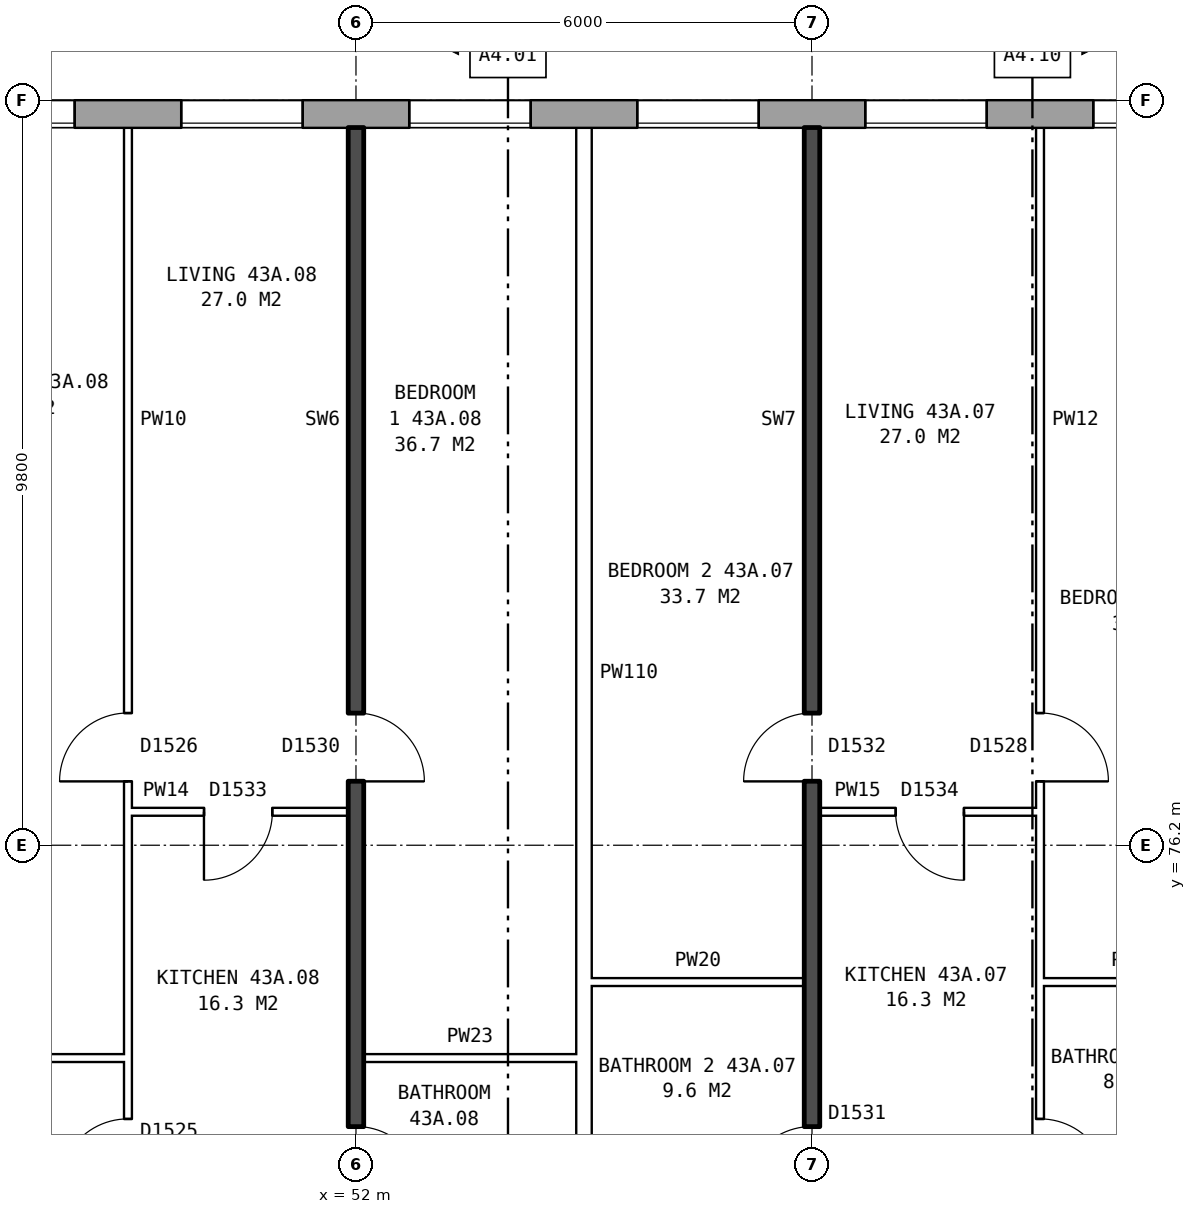
"""IFC4 building model, lengths in metres.
Left out: names, types, materials, properties, quantities, classifications, styles, units other than length and angle.
Written with IfcOpenShell. Run it as: python <this file> out.ifc"""

import sys

from ifc_helpers import new_model, si_unit, direction, frame, frame_2d, origin, place, context, subcontext, project, spatial, rectangle, extrude, element, fill, save


model = new_model("IFC4")
c1 = context("Model", 3, precision=1e-05, world=origin(), true_north=direction((0.0, 1.0)))
c2 = subcontext(c1, "Body", "Model", "MODEL_VIEW")
j1 = project(units=[si_unit("LENGTHUNIT", "METRE"), si_unit("PLANEANGLEUNIT", "RADIAN")], contexts=[c1])
p1 = place(None, origin())
s1 = spatial("IfcSite", under=j1, at=p1, CompositionType="ELEMENT")
p2 = place(p1, origin())
s2 = spatial("IfcBuilding", under=s1, at=p2, CompositionType="ELEMENT")
p3 = place(p2, frame((0.0, 0.0, 154.7)))
s3 = spatial("IfcBuildingStorey", under=s2, at=p3, CompositionType="ELEMENT", Elevation=154.7)
p4 = place(p3, frame((72.925, 85.82, 0.0), z_axis=(0.0, 0.0, 1.0), x_axis=(-1.0, 0.0, 0.0)))
e1 = element("IfcWall", 1, at=p4, inside=s3, PredefinedType="STANDARD", context=c2, shape_type="SweptSolid", body=[
    extrude(rectangle(XDim=41.351, YDim=0.36, at=frame_2d((20.675, 0.0))), origin(), (0.0, 0.0, 1.0), 2.85),
])
p5 = place(p4, frame((0.625, 0.0, 0.8)))
e2 = element("IfcOpeningElement", 2, at=p5, cuts=e1, PredefinedType="OPENING", context=c2, shape_type="SweptSolid", body=[
    extrude(rectangle(XDim=1.6, YDim=1.8, at=frame_2d((0.8, 0.9))), frame((0.0, 0.19, 0.0), z_axis=(0.0, -1.0, 0.0), x_axis=(1.0, 0.0, 0.0)), (0.0, 0.0, 1.0), 0.38),
])
p6 = place(p4, frame((3.625, 0.0, 0.8)))
e3 = element("IfcOpeningElement", 3, at=p6, cuts=e1, PredefinedType="OPENING", context=c2, shape_type="SweptSolid", body=[
    extrude(rectangle(XDim=1.6, YDim=1.8, at=frame_2d((0.8, 0.9))), frame((0.0, 0.19, 0.0), z_axis=(0.0, -1.0, 0.0), x_axis=(1.0, 0.0, 0.0)), (0.0, 0.0, 1.0), 0.38),
])
p7 = place(p4, frame((5.525, 0.0, 1.7)))
e4 = element("IfcOpeningElement", 4, at=p7, cuts=e1, PredefinedType="OPENING", context=c2, shape_type="SweptSolid", body=[
    extrude(rectangle(XDim=1.4, YDim=0.9, at=frame_2d((0.7, 0.45))), frame((0.0, 0.19, 0.0), z_axis=(0.0, -1.0, 0.0), x_axis=(1.0, 0.0, 0.0)), (0.0, 0.0, 1.0), 0.38),
])
p8 = place(p4, frame((9.625, 0.0, 0.8)))
e5 = element("IfcOpeningElement", 5, at=p8, cuts=e1, PredefinedType="OPENING", context=c2, shape_type="SweptSolid", body=[
    extrude(rectangle(XDim=1.6, YDim=1.8, at=frame_2d((0.8, 0.9))), frame((0.0, 0.19, 0.0), z_axis=(0.0, -1.0, 0.0), x_axis=(1.0, 0.0, 0.0)), (0.0, 0.0, 1.0), 0.38),
])
p9 = place(p4, frame((12.625, 0.0, 0.8)))
e6 = element("IfcOpeningElement", 6, at=p9, cuts=e1, PredefinedType="OPENING", context=c2, shape_type="SweptSolid", body=[
    extrude(rectangle(XDim=1.6, YDim=1.8, at=frame_2d((0.8, 0.9))), frame((0.0, 0.19, 0.0), z_axis=(0.0, -1.0, 0.0), x_axis=(1.0, 0.0, 0.0)), (0.0, 0.0, 1.0), 0.38),
])
p10 = place(p4, frame((15.625, 0.0, 0.8)))
e7 = element("IfcOpeningElement", 7, at=p10, cuts=e1, PredefinedType="OPENING", context=c2, shape_type="SweptSolid", body=[
    extrude(rectangle(XDim=1.6, YDim=1.8, at=frame_2d((0.8, 0.9))), frame((0.0, 0.19, 0.0), z_axis=(0.0, -1.0, 0.0), x_axis=(1.0, 0.0, 0.0)), (0.0, 0.0, 1.0), 0.38),
])
p11 = place(p4, frame((18.625, 0.0, 0.8)))
e8 = element("IfcOpeningElement", 8, at=p11, cuts=e1, PredefinedType="OPENING", context=c2, shape_type="SweptSolid", body=[
    extrude(rectangle(XDim=1.6, YDim=1.8, at=frame_2d((0.8, 0.9))), frame((0.0, 0.19, 0.0), z_axis=(0.0, -1.0, 0.0), x_axis=(1.0, 0.0, 0.0)), (0.0, 0.0, 1.0), 0.38),
])
p12 = place(p4, frame((21.625, 0.0, 0.8)))
e9 = element("IfcOpeningElement", 9, at=p12, cuts=e1, PredefinedType="OPENING", context=c2, shape_type="SweptSolid", body=[
    extrude(rectangle(XDim=1.6, YDim=1.8, at=frame_2d((0.8, 0.9))), frame((0.0, 0.19, 0.0), z_axis=(0.0, -1.0, 0.0), x_axis=(1.0, 0.0, 0.0)), (0.0, 0.0, 1.0), 0.38),
])
p13 = place(p4, frame((24.625, 0.0, 0.8)))
e10 = element("IfcOpeningElement", 10, at=p13, cuts=e1, PredefinedType="OPENING", context=c2, shape_type="SweptSolid", body=[
    extrude(rectangle(XDim=1.6, YDim=1.8, at=frame_2d((0.8, 0.9))), frame((0.0, 0.19, 0.0), z_axis=(0.0, -1.0, 0.0), x_axis=(1.0, 0.0, 0.0)), (0.0, 0.0, 1.0), 0.38),
])
p14 = place(p4, frame((27.625, 0.0, 0.8)))
e11 = element("IfcOpeningElement", 11, at=p14, cuts=e1, PredefinedType="OPENING", context=c2, shape_type="SweptSolid", body=[
    extrude(rectangle(XDim=1.6, YDim=1.8, at=frame_2d((0.8, 0.9))), frame((0.0, 0.19, 0.0), z_axis=(0.0, -1.0, 0.0), x_axis=(1.0, 0.0, 0.0)), (0.0, 0.0, 1.0), 0.38),
])
p15 = place(p4, frame((30.625, 0.0, 0.8)))
e12 = element("IfcOpeningElement", 12, at=p15, cuts=e1, PredefinedType="OPENING", context=c2, shape_type="SweptSolid", body=[
    extrude(rectangle(XDim=1.6, YDim=1.8, at=frame_2d((0.8, 0.9))), frame((0.0, 0.19, 0.0), z_axis=(0.0, -1.0, 0.0), x_axis=(1.0, 0.0, 0.0)), (0.0, 0.0, 1.0), 0.38),
])
p16 = place(p4, frame((34.425, 0.0, 1.7)))
e13 = element("IfcOpeningElement", 13, at=p16, cuts=e1, PredefinedType="OPENING", context=c2, shape_type="SweptSolid", body=[
    extrude(rectangle(XDim=0.6, YDim=0.9, at=frame_2d((0.3, 0.45))), frame((0.0, 0.19, 0.0), z_axis=(0.0, -1.0, 0.0), x_axis=(1.0, 0.0, 0.0)), (0.0, 0.0, 1.0), 0.38),
])
p17 = place(p4, frame((36.625, 0.0, 0.8)))
e14 = element("IfcOpeningElement", 14, at=p17, cuts=e1, PredefinedType="OPENING", context=c2, shape_type="SweptSolid", body=[
    extrude(rectangle(XDim=1.6, YDim=1.8, at=frame_2d((0.8, 0.9))), frame((0.0, 0.19, 0.0), z_axis=(0.0, -1.0, 0.0), x_axis=(1.0, 0.0, 0.0)), (0.0, 0.0, 1.0), 0.38),
])
p18 = place(p4, frame((35.325, 0.0, 1.0)))
e15 = element("IfcOpeningElement", 15, at=p18, cuts=e1, PredefinedType="OPENING", context=c2, shape_type="SweptSolid", body=[
    extrude(rectangle(XDim=1.0, YDim=1.5, at=frame_2d((0.5, 0.75))), frame((0.0, 0.19, 0.0), z_axis=(0.0, -1.0, 0.0), x_axis=(1.0, 0.0, 0.0)), (0.0, 0.0, 1.0), 0.38),
])
p19 = place(p3, frame((46.1, 73.4, 0.0), z_axis=(0.0, 0.0, 1.0), x_axis=(1.0, 0.0, 0.0)))
e16 = element("IfcWall", 16, at=p19, inside=s3, PredefinedType="PARTITIONING", context=c2, shape_type="SweptSolid", body=[
    extrude(rectangle(XDim=2.9, YDim=0.1, at=frame_2d((1.45, 0.0))), origin(), (0.0, 0.0, 1.0), 2.85),
])
for number, where, z_axis, x_axis in (
    (17, (52.1, 73.4, 0.0), (0.0, 0.0, 1.0), (1.0, 0.0, 0.0)),
    (18, (55.1, 74.4, 0.0), (0.0, 0.0, 1.0), (1.0, 0.0, 0.0)),
):
    element("IfcWall", number, at=place(p3, frame(where, z_axis=z_axis, x_axis=x_axis)), inside=s3, PredefinedType="PARTITIONING", context=c2, shape_type="SweptSolid", body=[
        extrude(rectangle(XDim=2.8, YDim=0.1, at=frame_2d((1.4, 0.0))), origin(), (0.0, 0.0, 1.0), 2.85),
    ])
p20 = place(p3, frame((61.0, 74.4, 0.0), z_axis=(0.0, 0.0, 1.0), x_axis=(1.0, 0.0, 0.0)))
e19 = element("IfcWall", 19, at=p20, inside=s3, PredefinedType="PARTITIONING", context=c2, shape_type="SweptSolid", body=[
    extrude(rectangle(XDim=2.64, YDim=0.1, at=frame_2d((1.32, 0.0))), origin(), (0.0, 0.0, 1.0), 2.85),
])
p21 = place(p3, frame((49.0, 76.64, 0.0), z_axis=(0.0, 0.0, 1.0), x_axis=(1.0, 0.0, 0.0)))
e20 = element("IfcWall", 20, at=p21, inside=s3, PredefinedType="PARTITIONING", context=c2, shape_type="SweptSolid", body=[
    extrude(rectangle(XDim=2.9, YDim=0.1, at=frame_2d((1.45, 0.0))), origin(), (0.0, 0.0, 1.0), 2.85),
])
p22 = place(p21, frame((1.0, 0.0, 0.0)))
e21 = element("IfcOpeningElement", 21, at=p22, cuts=e20, PredefinedType="OPENING", context=c2, shape_type="SweptSolid", body=[
    extrude(rectangle(XDim=0.9, YDim=2.1, at=frame_2d((0.45, 1.05))), frame((0.0, 0.06, 0.0), z_axis=(0.0, -1.0, 0.0), x_axis=(1.0, 0.0, 0.0)), (0.0, 0.0, 1.0), 0.12),
])
p23 = place(p3, frame((58.1, 76.64, 0.0), z_axis=(0.0, 0.0, 1.0), x_axis=(1.0, 0.0, 0.0)))
e22 = element("IfcWall", 22, at=p23, inside=s3, PredefinedType="PARTITIONING", context=c2, shape_type="SweptSolid", body=[
    extrude(rectangle(XDim=2.9, YDim=0.1, at=frame_2d((1.45, 0.0))), origin(), (0.0, 0.0, 1.0), 2.85),
])
p24 = place(p23, frame((1.0, 0.0, 0.0)))
e23 = element("IfcOpeningElement", 23, at=p24, cuts=e22, PredefinedType="OPENING", context=c2, shape_type="SweptSolid", body=[
    extrude(rectangle(XDim=0.9, YDim=2.1, at=frame_2d((0.45, 1.05))), frame((0.0, 0.06, 0.0), z_axis=(0.0, -1.0, 0.0), x_axis=(1.0, 0.0, 0.0)), (0.0, 0.0, 1.0), 0.12),
])
p25 = place(p3, frame((49.0, 71.3, 0.0), z_axis=(0.0, 0.0, 1.0), x_axis=(0.0, 1.0, 0.0)))
e24 = element("IfcWall", 24, at=p25, inside=s3, PredefinedType="PARTITIONING", context=c2, shape_type="SweptSolid", body=[
    extrude(rectangle(XDim=14.34, YDim=0.1, at=frame_2d((7.17, 0.0))), origin(), (0.0, 0.0, 1.0), 2.85),
])
p26 = place(p25, frame((5.74, 0.0, 0.0)))
e25 = element("IfcOpeningElement", 25, at=p26, cuts=e24, PredefinedType="OPENING", context=c2, shape_type="SweptSolid", body=[
    extrude(rectangle(XDim=0.9, YDim=2.1, at=frame_2d((0.45, 1.05))), frame((0.0, 0.06, 0.0), z_axis=(0.0, -1.0, 0.0), x_axis=(1.0, 0.0, 0.0)), (0.0, 0.0, 1.0), 0.12),
])
p27 = place(p25, frame((0.4, 0.0, 0.0)))
e26 = element("IfcOpeningElement", 26, at=p27, cuts=e24, PredefinedType="OPENING", context=c2, shape_type="SweptSolid", body=[
    extrude(rectangle(XDim=0.9, YDim=2.1, at=frame_2d((0.45, 1.05))), frame((0.0, 0.06, 0.0), z_axis=(0.0, -1.0, 0.0), x_axis=(1.0, 0.0, 0.0)), (0.0, 0.0, 1.0), 0.12),
])
p28 = place(p3, frame((52.0, 71.2, 0.0), z_axis=(0.0, 0.0, 1.0), x_axis=(0.0, 1.0, 0.0)))
e27 = element("IfcWall", 27, at=p28, inside=s3, PredefinedType="SOLIDWALL", context=c2, shape_type="SweptSolid", body=[
    extrude(rectangle(XDim=14.44, YDim=0.2, at=frame_2d((7.22, 0.0))), origin(), (0.0, 0.0, 1.0), 2.85),
])
p29 = place(p28, frame((5.84, 0.0, 0.0)))
e28 = element("IfcOpeningElement", 28, at=p29, cuts=e27, PredefinedType="OPENING", context=c2, shape_type="SweptSolid", body=[
    extrude(rectangle(XDim=0.9, YDim=2.1, at=frame_2d((0.45, 1.05))), frame((0.0, 0.11, 0.0), z_axis=(0.0, -1.0, 0.0), x_axis=(1.0, 0.0, 0.0)), (0.0, 0.0, 1.0), 0.22),
])
p30 = place(p28, frame((0.4, 0.0, 0.0)))
e29 = element("IfcOpeningElement", 29, at=p30, cuts=e27, PredefinedType="OPENING", context=c2, shape_type="SweptSolid", body=[
    extrude(rectangle(XDim=0.9, YDim=2.1, at=frame_2d((0.45, 1.05))), frame((0.0, 0.11, 0.0), z_axis=(0.0, -1.0, 0.0), x_axis=(1.0, 0.0, 0.0)), (0.0, 0.0, 1.0), 0.22),
])
p31 = place(p3, frame((55.0, 71.3, 0.0), z_axis=(0.0, 0.0, 1.0), x_axis=(0.0, 1.0, 0.0)))
e30 = element("IfcWall", 30, at=p31, inside=s3, PredefinedType="PARTITIONING", context=c2, shape_type="SweptSolid", body=[
    extrude(rectangle(XDim=14.34, YDim=0.2, at=frame_2d((7.17, 0.0))), origin(), (0.0, 0.0, 1.0), 2.85),
])
p32 = place(p3, frame((58.0, 71.2, 0.0), z_axis=(0.0, 0.0, 1.0), x_axis=(0.0, 1.0, 0.0)))
e31 = element("IfcWall", 31, at=p32, inside=s3, PredefinedType="SOLIDWALL", context=c2, shape_type="SweptSolid", body=[
    extrude(rectangle(XDim=14.44, YDim=0.2, at=frame_2d((7.22, 0.0))), origin(), (0.0, 0.0, 1.0), 2.85),
])
p33 = place(p32, frame((5.84, 0.0, 0.0)))
e32 = element("IfcOpeningElement", 32, at=p33, cuts=e31, PredefinedType="OPENING", context=c2, shape_type="SweptSolid", body=[
    extrude(rectangle(XDim=0.9, YDim=2.1, at=frame_2d((0.45, 1.05))), frame((0.0, 0.11, 0.0), z_axis=(0.0, -1.0, 0.0), x_axis=(1.0, 0.0, 0.0)), (0.0, 0.0, 1.0), 0.22),
])
p34 = place(p32, frame((0.4, 0.0, 0.0)))
e33 = element("IfcOpeningElement", 33, at=p34, cuts=e31, PredefinedType="OPENING", context=c2, shape_type="SweptSolid", body=[
    extrude(rectangle(XDim=0.9, YDim=2.1, at=frame_2d((0.45, 1.05))), frame((0.0, 0.11, 0.0), z_axis=(0.0, -1.0, 0.0), x_axis=(1.0, 0.0, 0.0)), (0.0, 0.0, 1.0), 0.22),
])
p35 = place(p3, frame((61.0, 71.3, 0.0), z_axis=(0.0, 0.0, 1.0), x_axis=(0.0, 1.0, 0.0)))
e34 = element("IfcWall", 34, at=p35, inside=s3, PredefinedType="PARTITIONING", context=c2, shape_type="SweptSolid", body=[
    extrude(rectangle(XDim=14.34, YDim=0.1, at=frame_2d((7.17, 0.0))), origin(), (0.0, 0.0, 1.0), 2.85),
])
p36 = place(p35, frame((5.74, 0.0, 0.0)))
e35 = element("IfcOpeningElement", 35, at=p36, cuts=e34, PredefinedType="OPENING", context=c2, shape_type="SweptSolid", body=[
    extrude(rectangle(XDim=0.9, YDim=2.1, at=frame_2d((0.45, 1.05))), frame((0.0, 0.06, 0.0), z_axis=(0.0, -1.0, 0.0), x_axis=(1.0, 0.0, 0.0)), (0.0, 0.0, 1.0), 0.12),
])
p37 = place(p35, frame((0.4, 0.0, 0.0)))
e36 = element("IfcOpeningElement", 36, at=p37, cuts=e34, PredefinedType="OPENING", context=c2, shape_type="SweptSolid", body=[
    extrude(rectangle(XDim=0.9, YDim=2.1, at=frame_2d((0.45, 1.05))), frame((0.0, 0.06, 0.0), z_axis=(0.0, -1.0, 0.0), x_axis=(1.0, 0.0, 0.0)), (0.0, 0.0, 1.0), 0.12),
])
p38 = place(p8, origin())
e37 = element("IfcWindow", 37, at=p38, inside=s3, PartitioningType="SINGLE_PANEL", PredefinedType="WINDOW", context=c2, shape_type="SweptSolid", body=[
    extrude(rectangle(XDim=1.6, YDim=1.8, at=frame_2d((0.8, 0.9))), frame((0.0, 0.15, 0.0), z_axis=(0.0, -1.0, 0.0), x_axis=(1.0, 0.0, 0.0)), (0.0, 0.0, 1.0), 0.06),
])
fill(e5, e37)
p39 = place(p9, origin())
e38 = element("IfcWindow", 38, at=p39, inside=s3, PartitioningType="SINGLE_PANEL", PredefinedType="WINDOW", context=c2, shape_type="SweptSolid", body=[
    extrude(rectangle(XDim=1.6, YDim=1.8, at=frame_2d((0.8, 0.9))), frame((0.0, 0.15, 0.0), z_axis=(0.0, -1.0, 0.0), x_axis=(1.0, 0.0, 0.0)), (0.0, 0.0, 1.0), 0.06),
])
fill(e6, e38)
p40 = place(p10, origin())
e39 = element("IfcWindow", 39, at=p40, inside=s3, PartitioningType="SINGLE_PANEL", PredefinedType="WINDOW", context=c2, shape_type="SweptSolid", body=[
    extrude(rectangle(XDim=1.6, YDim=1.8, at=frame_2d((0.8, 0.9))), frame((0.0, 0.15, 0.0), z_axis=(0.0, -1.0, 0.0), x_axis=(1.0, 0.0, 0.0)), (0.0, 0.0, 1.0), 0.06),
])
fill(e7, e39)
p41 = place(p11, origin())
e40 = element("IfcWindow", 40, at=p41, inside=s3, PartitioningType="SINGLE_PANEL", PredefinedType="WINDOW", context=c2, shape_type="SweptSolid", body=[
    extrude(rectangle(XDim=1.6, YDim=1.8, at=frame_2d((0.8, 0.9))), frame((0.0, 0.15, 0.0), z_axis=(0.0, -1.0, 0.0), x_axis=(1.0, 0.0, 0.0)), (0.0, 0.0, 1.0), 0.06),
])
fill(e8, e40)
p42 = place(p12, origin())
e41 = element("IfcWindow", 41, at=p42, inside=s3, PartitioningType="SINGLE_PANEL", PredefinedType="WINDOW", context=c2, shape_type="SweptSolid", body=[
    extrude(rectangle(XDim=1.6, YDim=1.8, at=frame_2d((0.8, 0.9))), frame((0.0, 0.15, 0.0), z_axis=(0.0, -1.0, 0.0), x_axis=(1.0, 0.0, 0.0)), (0.0, 0.0, 1.0), 0.06),
])
fill(e9, e41)
p43 = place(p13, origin())
e42 = element("IfcWindow", 42, at=p43, inside=s3, PartitioningType="SINGLE_PANEL", PredefinedType="WINDOW", context=c2, shape_type="SweptSolid", body=[
    extrude(rectangle(XDim=1.6, YDim=1.8, at=frame_2d((0.8, 0.9))), frame((0.0, 0.15, 0.0), z_axis=(0.0, -1.0, 0.0), x_axis=(1.0, 0.0, 0.0)), (0.0, 0.0, 1.0), 0.06),
])
fill(e10, e42)
p44 = place(p36, frame((0.9, 0.0, 0.0), z_axis=(0.0, 0.0, 1.0), x_axis=(-1.0, 0.0, 0.0)))
e43 = element("IfcDoor", 43, at=p44, inside=s3, OperationType="SINGLE_SWING_RIGHT", PredefinedType="DOOR", context=c2, shape_type="SweptSolid", body=[
    extrude(rectangle(XDim=0.9, YDim=2.1, at=frame_2d((0.45, 1.05))), frame((0.0, 0.025, 0.0), z_axis=(0.0, -1.0, 0.0), x_axis=(1.0, 0.0, 0.0)), (0.0, 0.0, 1.0), 0.05),
])
fill(e35, e43)
p45 = place(p33, origin())
e44 = element("IfcDoor", 44, at=p45, inside=s3, OperationType="SINGLE_SWING_LEFT", PredefinedType="DOOR", context=c2, shape_type="SweptSolid", body=[
    extrude(rectangle(XDim=0.9, YDim=2.1, at=frame_2d((0.45, 1.05))), frame((0.0, 0.025, 0.0), z_axis=(0.0, -1.0, 0.0), x_axis=(1.0, 0.0, 0.0)), (0.0, 0.0, 1.0), 0.05),
])
fill(e32, e44)
p46 = place(p24, frame((0.9, 0.0, 0.0), z_axis=(0.0, 0.0, 1.0), x_axis=(-1.0, 0.0, 0.0)))
e45 = element("IfcDoor", 45, at=p46, inside=s3, OperationType="SINGLE_SWING_LEFT", PredefinedType="DOOR", context=c2, shape_type="SweptSolid", body=[
    extrude(rectangle(XDim=0.9, YDim=2.1, at=frame_2d((0.45, 1.05))), frame((0.0, 0.025, 0.0), z_axis=(0.0, -1.0, 0.0), x_axis=(1.0, 0.0, 0.0)), (0.0, 0.0, 1.0), 0.05),
])
fill(e23, e45)
p47 = place(p37, frame((0.9, 0.0, 0.0), z_axis=(0.0, 0.0, 1.0), x_axis=(-1.0, 0.0, 0.0)))
e46 = element("IfcDoor", 46, at=p47, inside=s3, OperationType="SINGLE_SWING_RIGHT", PredefinedType="DOOR", context=c2, shape_type="SweptSolid", body=[
    extrude(rectangle(XDim=0.9, YDim=2.1, at=frame_2d((0.45, 1.05))), frame((0.0, 0.025, 0.0), z_axis=(0.0, -1.0, 0.0), x_axis=(1.0, 0.0, 0.0)), (0.0, 0.0, 1.0), 0.05),
])
fill(e36, e46)
p48 = place(p34, origin())
e47 = element("IfcDoor", 47, at=p48, inside=s3, OperationType="SINGLE_SWING_LEFT", PredefinedType="DOOR", context=c2, shape_type="SweptSolid", body=[
    extrude(rectangle(XDim=0.9, YDim=2.1, at=frame_2d((0.45, 1.05))), frame((0.0, 0.025, 0.0), z_axis=(0.0, -1.0, 0.0), x_axis=(1.0, 0.0, 0.0)), (0.0, 0.0, 1.0), 0.05),
])
fill(e33, e47)
p49 = place(p29, frame((0.9, 0.0, 0.0), z_axis=(0.0, 0.0, 1.0), x_axis=(-1.0, 0.0, 0.0)))
e48 = element("IfcDoor", 48, at=p49, inside=s3, OperationType="SINGLE_SWING_RIGHT", PredefinedType="DOOR", context=c2, shape_type="SweptSolid", body=[
    extrude(rectangle(XDim=0.9, YDim=2.1, at=frame_2d((0.45, 1.05))), frame((0.0, 0.025, 0.0), z_axis=(0.0, -1.0, 0.0), x_axis=(1.0, 0.0, 0.0)), (0.0, 0.0, 1.0), 0.05),
])
fill(e28, e48)
p50 = place(p26, origin())
e49 = element("IfcDoor", 49, at=p50, inside=s3, OperationType="SINGLE_SWING_LEFT", PredefinedType="DOOR", context=c2, shape_type="SweptSolid", body=[
    extrude(rectangle(XDim=0.9, YDim=2.1, at=frame_2d((0.45, 1.05))), frame((0.0, 0.025, 0.0), z_axis=(0.0, -1.0, 0.0), x_axis=(1.0, 0.0, 0.0)), (0.0, 0.0, 1.0), 0.05),
])
fill(e25, e49)
p51 = place(p22, frame((0.9, 0.0, 0.0), z_axis=(0.0, 0.0, 1.0), x_axis=(-1.0, 0.0, 0.0)))
e50 = element("IfcDoor", 50, at=p51, inside=s3, OperationType="SINGLE_SWING_RIGHT", PredefinedType="DOOR", context=c2, shape_type="SweptSolid", body=[
    extrude(rectangle(XDim=0.9, YDim=2.1, at=frame_2d((0.45, 1.05))), frame((0.0, 0.025, 0.0), z_axis=(0.0, -1.0, 0.0), x_axis=(1.0, 0.0, 0.0)), (0.0, 0.0, 1.0), 0.05),
])
fill(e21, e50)
p52 = place(p30, frame((0.9, 0.0, 0.0), z_axis=(0.0, 0.0, 1.0), x_axis=(-1.0, 0.0, 0.0)))
e51 = element("IfcDoor", 51, at=p52, inside=s3, OperationType="SINGLE_SWING_RIGHT", PredefinedType="DOOR", context=c2, shape_type="SweptSolid", body=[
    extrude(rectangle(XDim=0.9, YDim=2.1, at=frame_2d((0.45, 1.05))), frame((0.0, 0.025, 0.0), z_axis=(0.0, -1.0, 0.0), x_axis=(1.0, 0.0, 0.0)), (0.0, 0.0, 1.0), 0.05),
])
fill(e29, e51)
p53 = place(p27, origin())
e52 = element("IfcDoor", 52, at=p53, inside=s3, OperationType="SINGLE_SWING_LEFT", PredefinedType="DOOR", context=c2, shape_type="SweptSolid", body=[
    extrude(rectangle(XDim=0.9, YDim=2.1, at=frame_2d((0.45, 1.05))), frame((0.0, 0.025, 0.0), z_axis=(0.0, -1.0, 0.0), x_axis=(1.0, 0.0, 0.0)), (0.0, 0.0, 1.0), 0.05),
])
fill(e26, e52)
save(model, sys.argv[1])
